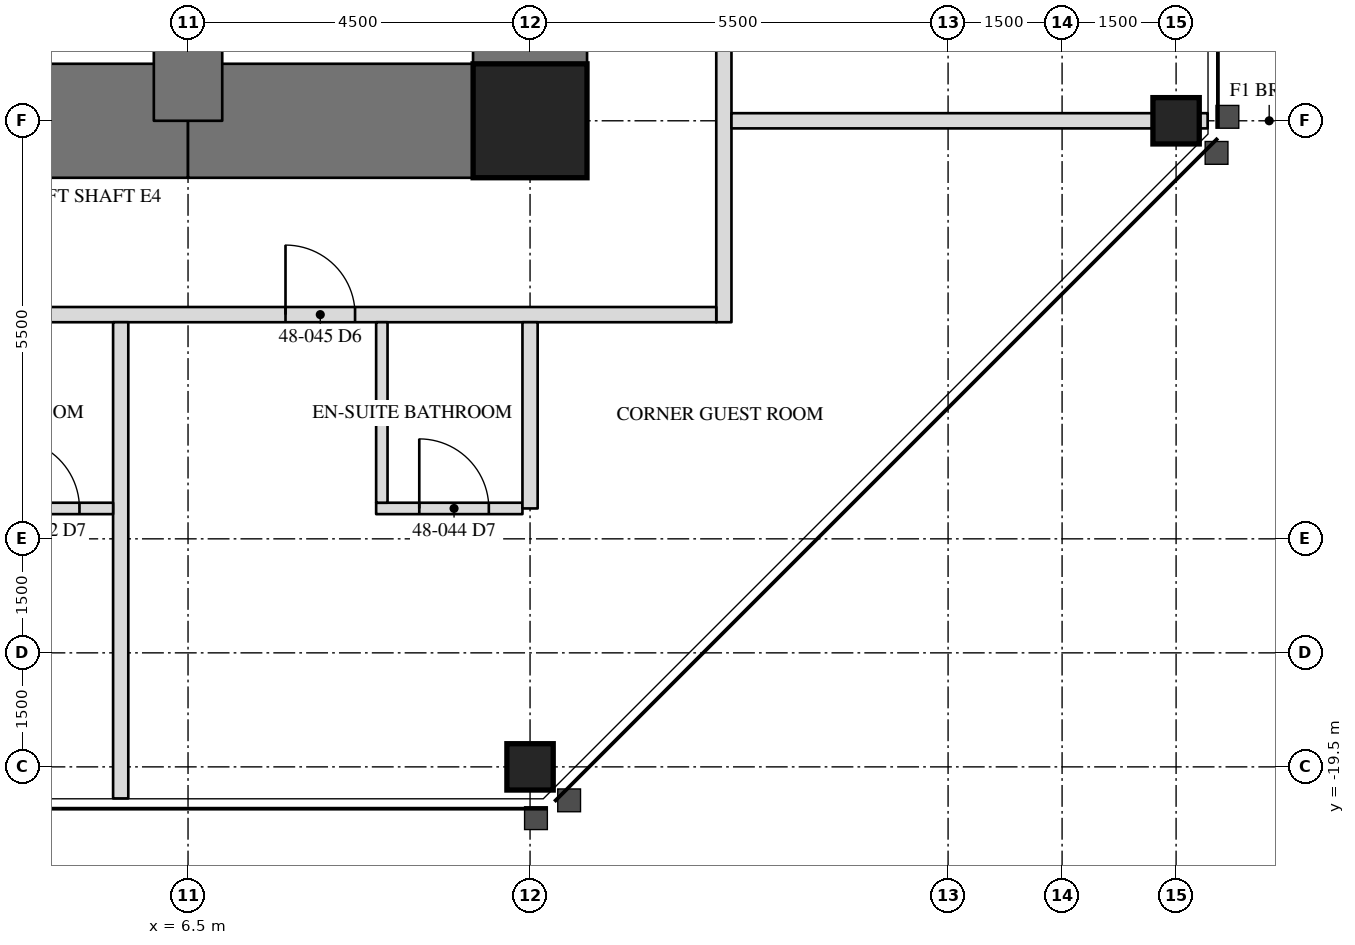
"""IFC4 building model, lengths in metres.
Left out: names, types, materials, properties, quantities, classifications, styles, units other than length and angle.
Written with IfcOpenShell. Run it as: python <this file> out.ifc"""

import sys

from ifc_helpers import new_model, si_unit, direction, frame, frame_2d, origin, origin_2d, place, context, subcontext, project, spatial, rectangle, hollow_rectangle, extrude, element, fill, save


model = new_model("IFC4")
c1 = context("Model", 3, precision=1e-05, world=origin(), true_north=direction((0.0, 1.0)))
c2 = subcontext(c1, "Body", "Model", "MODEL_VIEW")
j1 = project(units=[si_unit("LENGTHUNIT", "METRE"), si_unit("PLANEANGLEUNIT", "RADIAN")], contexts=[c1])
p1 = place(None, origin())
s1 = spatial("IfcSite", under=j1, at=p1, CompositionType="ELEMENT")
p2 = place(p1, origin())
s2 = spatial("IfcBuilding", under=s1, at=p2, CompositionType="ELEMENT")
p3 = place(p2, frame((0.0, 0.0, 204.7)))
s3 = spatial("IfcBuildingStorey", under=s2, at=p3, CompositionType="ELEMENT", Elevation=204.7)
for number, where, z_axis, x_axis in (
    (1, (11.0, -19.5, 0.0), (0.0, 0.0, 1.0), (1.0, 0.0, 0.0)),
    (2, (19.5, -11.0, 0.0), (0.0, 0.0, 1.0), (0.0, 1.0, 0.0)),
):
    element("IfcColumn", number, at=place(p3, frame(where, z_axis=z_axis, x_axis=x_axis)), inside=s3, PredefinedType="COLUMN", context=c2, shape_type="SweptSolid", body=[
        extrude(hollow_rectangle(XDim=0.61, YDim=0.61, WallThickness=0.076, at=origin_2d()), origin(), (0.0, 0.0, 1.0), 3.5),
    ])
p4 = place(p3, frame((11.0, -11.0, 0.0), z_axis=(0.0, 0.0, 1.0), x_axis=(0.0, 1.0, 0.0)))
e3 = element("IfcWall", 3, at=p4, inside=s3, PredefinedType="SHEAR", context=c2, shape_type="SweptSolid", body=[
    extrude(rectangle(XDim=22.0, YDim=1.5, at=frame_2d((11.0, 0.0))), origin(), (0.0, 0.0, 1.0), 3.5),
])
p5 = place(p4, frame((15.393, 0.0, 0.0)))
e4 = element("IfcOpeningElement", 4, at=p5, cuts=e3, PredefinedType="OPENING", context=c2, shape_type="SweptSolid", body=[
    extrude(rectangle(XDim=0.915, YDim=2.134, at=frame_2d((0.458, 1.067))), frame((0.0, 0.76, 0.0), z_axis=(0.0, -1.0, 0.0), x_axis=(1.0, 0.0, 0.0)), (0.0, 0.0, 1.0), 1.52),
])
p6 = place(p3, frame((-6.5, -11.0, 0.0), z_axis=(0.0, 0.0, 1.0), x_axis=(1.0, 0.0, 0.0)))
e5 = element("IfcWall", 5, at=p6, inside=s3, PredefinedType="SHEAR", context=c2, shape_type="SweptSolid", body=[
    extrude(rectangle(XDim=13.0, YDim=1.5, at=frame_2d((6.5, 0.0))), origin(), (0.0, 0.0, 1.0), 3.5),
])
p7 = place(p3, frame((6.5, -11.0, 0.0), z_axis=(0.0, 0.0, 1.0), x_axis=(1.0, 0.0, 0.0)))
e6 = element("IfcWall", 6, at=p7, inside=s3, PredefinedType="SHEAR", context=c2, shape_type="SweptSolid", body=[
    extrude(rectangle(XDim=4.5, YDim=1.5, at=frame_2d((2.25, 0.0))), origin(), (0.0, 0.0, 1.0), 3.5),
])
p8 = place(p3, frame((6.5, -11.0, 0.0), z_axis=(0.0, 0.0, 1.0), x_axis=(0.0, 1.0, 0.0)))
e7 = element("IfcWall", 7, at=p8, inside=s3, PredefinedType="SHEAR", context=c2, shape_type="SweptSolid", body=[
    extrude(rectangle(XDim=4.5, YDim=0.9, at=frame_2d((2.25, 0.0))), origin(), (0.0, 0.0, 1.0), 3.5),
])
p9 = place(p3, frame((11.0, -11.0, 0.0), z_axis=(0.0, 0.0, 1.0), x_axis=(1.0, 0.0, 0.0)))
e8 = element("IfcColumn", 8, at=p9, inside=s3, PredefinedType="COLUMN", context=c2, shape_type="SweptSolid", body=[
    extrude(hollow_rectangle(XDim=1.499, YDim=1.499, WallThickness=0.102, at=origin_2d()), origin(), (0.0, 0.0, 1.0), 3.5),
])
p10 = place(p3, frame((13.55, -13.65, 0.0), z_axis=(0.0, 0.0, 1.0), x_axis=(0.0, 1.0, 0.0)))
e9 = element("IfcWall", 9, at=p10, inside=s3, PredefinedType="PARTITIONING", context=c2, shape_type="SweptSolid", body=[
    extrude(rectangle(XDim=27.1, YDim=0.2, at=frame_2d((13.55, 0.0))), origin(), (0.0, 0.0, 1.0), 3.31),
])
p11 = place(p10, frame((4.283, 0.0, 0.0)))
e10 = element("IfcOpeningElement", 10, at=p11, cuts=e9, PredefinedType="OPENING", context=c2, shape_type="SweptSolid", body=[
    extrude(rectangle(XDim=0.915, YDim=2.134, at=frame_2d((0.458, 1.067))), frame((0.0, 0.11, 0.0), z_axis=(0.0, -1.0, 0.0), x_axis=(1.0, 0.0, 0.0)), (0.0, 0.0, 1.0), 0.22),
])
p12 = place(p10, frame((10.433, 0.0, 0.0)))
e11 = element("IfcOpeningElement", 11, at=p12, cuts=e9, PredefinedType="OPENING", context=c2, shape_type="SweptSolid", body=[
    extrude(rectangle(XDim=0.915, YDim=2.134, at=frame_2d((0.458, 1.067))), frame((0.0, 0.11, 0.0), z_axis=(0.0, -1.0, 0.0), x_axis=(1.0, 0.0, 0.0)), (0.0, 0.0, 1.0), 0.22),
])
p13 = place(p10, frame((16.046, 0.0, 0.0)))
e12 = element("IfcOpeningElement", 12, at=p13, cuts=e9, PredefinedType="OPENING", context=c2, shape_type="SweptSolid", body=[
    extrude(rectangle(XDim=0.915, YDim=2.134, at=frame_2d((0.458, 1.067))), frame((0.0, 0.11, 0.0), z_axis=(0.0, -1.0, 0.0), x_axis=(1.0, 0.0, 0.0)), (0.0, 0.0, 1.0), 0.22),
])
p14 = place(p10, frame((21.433, 0.0, 0.0)))
e13 = element("IfcOpeningElement", 13, at=p14, cuts=e9, PredefinedType="OPENING", context=c2, shape_type="SweptSolid", body=[
    extrude(rectangle(XDim=0.915, YDim=2.134, at=frame_2d((0.458, 1.067))), frame((0.0, 0.11, 0.0), z_axis=(0.0, -1.0, 0.0), x_axis=(1.0, 0.0, 0.0)), (0.0, 0.0, 1.0), 0.22),
])
p15 = place(p3, frame((-13.65, -13.55, 0.0), z_axis=(0.0, 0.0, 1.0), x_axis=(1.0, 0.0, 0.0)))
e14 = element("IfcWall", 14, at=p15, inside=s3, PredefinedType="PARTITIONING", context=c2, shape_type="SweptSolid", body=[
    extrude(rectangle(XDim=27.1, YDim=0.2, at=frame_2d((13.55, 0.0))), origin(), (0.0, 0.0, 1.0), 3.31),
])
p16 = place(p15, frame((4.884, 0.0, 0.0)))
e15 = element("IfcOpeningElement", 15, at=p16, cuts=e14, PredefinedType="OPENING", context=c2, shape_type="SweptSolid", body=[
    extrude(rectangle(XDim=0.915, YDim=2.134, at=frame_2d((0.458, 1.067))), frame((0.0, 0.11, 0.0), z_axis=(0.0, -1.0, 0.0), x_axis=(1.0, 0.0, 0.0)), (0.0, 0.0, 1.0), 0.22),
])
p17 = place(p15, frame((10.433, 0.0, 0.0)))
e16 = element("IfcOpeningElement", 16, at=p17, cuts=e14, PredefinedType="OPENING", context=c2, shape_type="SweptSolid", body=[
    extrude(rectangle(XDim=0.915, YDim=2.134, at=frame_2d((0.458, 1.067))), frame((0.0, 0.11, 0.0), z_axis=(0.0, -1.0, 0.0), x_axis=(1.0, 0.0, 0.0)), (0.0, 0.0, 1.0), 0.22),
])
p18 = place(p15, frame((16.046, 0.0, 0.0)))
e17 = element("IfcOpeningElement", 17, at=p18, cuts=e14, PredefinedType="OPENING", context=c2, shape_type="SweptSolid", body=[
    extrude(rectangle(XDim=0.915, YDim=2.134, at=frame_2d((0.458, 1.067))), frame((0.0, 0.11, 0.0), z_axis=(0.0, -1.0, 0.0), x_axis=(1.0, 0.0, 0.0)), (0.0, 0.0, 1.0), 0.22),
])
p19 = place(p15, frame((21.433, 0.0, 0.0)))
e18 = element("IfcOpeningElement", 18, at=p19, cuts=e14, PredefinedType="OPENING", context=c2, shape_type="SweptSolid", body=[
    extrude(rectangle(XDim=0.915, YDim=2.134, at=frame_2d((0.458, 1.067))), frame((0.0, 0.11, 0.0), z_axis=(0.0, -1.0, 0.0), x_axis=(1.0, 0.0, 0.0)), (0.0, 0.0, 1.0), 0.22),
])
p20 = place(p3, frame((13.65, -11.0, 0.0), z_axis=(0.0, 0.0, 1.0), x_axis=(1.0, 0.0, 0.0)))
e19 = element("IfcWall", 19, at=p20, inside=s3, PredefinedType="PARTITIONING", context=c2, shape_type="SweptSolid", body=[
    extrude(rectangle(XDim=6.265, YDim=0.2, at=frame_2d((3.133, 0.0))), origin(), (0.0, 0.0, 1.0), 2.802),
])
p21 = place(p3, frame((5.614, -13.65, 0.0), z_axis=(0.0, 0.0, 1.0), x_axis=(0.0, -1.0, 0.0)))
e20 = element("IfcWall", 20, at=p21, inside=s3, PredefinedType="PARTITIONING", context=c2, shape_type="SweptSolid", body=[
    extrude(rectangle(XDim=6.265, YDim=0.2, at=frame_2d((3.133, 0.0))), origin(), (0.0, 0.0, 1.0), 3.31),
])
p22 = place(p3, frame((3.589, -16.1, 0.0), z_axis=(0.0, 0.0, 1.0), x_axis=(1.0, 0.0, 0.0)))
e21 = element("IfcWall", 21, at=p22, inside=s3, PredefinedType="PARTITIONING", context=c2, shape_type="SweptSolid", body=[
    extrude(rectangle(XDim=1.925, YDim=0.15, at=frame_2d((0.962, 0.0))), origin(), (0.0, 0.0, 1.0), 3.31),
])
p23 = place(p22, frame((0.567, 0.0, 0.0)))
e22 = element("IfcOpeningElement", 22, at=p23, cuts=e21, PredefinedType="OPENING", context=c2, shape_type="SweptSolid", body=[
    extrude(rectangle(XDim=0.915, YDim=2.032, at=frame_2d((0.458, 1.016))), frame((0.0, 0.085, 0.0), z_axis=(0.0, -1.0, 0.0), x_axis=(1.0, 0.0, 0.0)), (0.0, 0.0, 1.0), 0.17),
])
p24 = place(p3, frame((8.975, -16.1, 0.0), z_axis=(0.0, 0.0, 1.0), x_axis=(1.0, 0.0, 0.0)))
e23 = element("IfcWall", 23, at=p24, inside=s3, PredefinedType="PARTITIONING", context=c2, shape_type="SweptSolid", body=[
    extrude(rectangle(XDim=1.925, YDim=0.15, at=frame_2d((0.962, 0.0))), origin(), (0.0, 0.0, 1.0), 3.31),
])
p25 = place(p24, frame((0.567, 0.0, 0.0)))
e24 = element("IfcOpeningElement", 24, at=p25, cuts=e23, PredefinedType="OPENING", context=c2, shape_type="SweptSolid", body=[
    extrude(rectangle(XDim=0.915, YDim=2.032, at=frame_2d((0.458, 1.016))), frame((0.0, 0.085, 0.0), z_axis=(0.0, -1.0, 0.0), x_axis=(1.0, 0.0, 0.0)), (0.0, 0.0, 1.0), 0.17),
])
p26 = place(p3, frame((9.05, -13.65, 0.0), z_axis=(0.0, 0.0, 1.0), x_axis=(0.0, -1.0, 0.0)))
e25 = element("IfcWall", 25, at=p26, inside=s3, PredefinedType="PARTITIONING", context=c2, shape_type="SweptSolid", body=[
    extrude(rectangle(XDim=2.375, YDim=0.15, at=frame_2d((1.188, 0.0))), origin(), (0.0, 0.0, 1.0), 3.31),
])
p27 = place(p3, frame((11.0, -13.65, 0.0), z_axis=(0.0, 0.0, 1.0), x_axis=(0.0, -1.0, 0.0)))
e26 = element("IfcWall", 26, at=p27, inside=s3, PredefinedType="PARTITIONING", context=c2, shape_type="SweptSolid", body=[
    extrude(rectangle(XDim=2.45, YDim=0.2, at=frame_2d((1.225, 0.0))), origin(), (0.0, 0.0, 1.0), 2.802),
])
p28 = place(p23, origin())
e27 = element("IfcDoor", 27, at=p28, inside=s3, OperationType="SINGLE_SWING_LEFT", PredefinedType="DOOR", context=c2, shape_type="SweptSolid", body=[
    extrude(rectangle(XDim=0.915, YDim=2.032, at=frame_2d((0.458, 1.016))), frame((0.0, 0.025, 0.0), z_axis=(0.0, -1.0, 0.0), x_axis=(1.0, 0.0, 0.0)), (0.0, 0.0, 1.0), 0.05),
])
fill(e22, e27)
p29 = place(p25, origin())
e28 = element("IfcDoor", 28, at=p29, inside=s3, OperationType="SINGLE_SWING_LEFT", PredefinedType="DOOR", context=c2, shape_type="SweptSolid", body=[
    extrude(rectangle(XDim=0.915, YDim=2.032, at=frame_2d((0.458, 1.016))), frame((0.0, 0.025, 0.0), z_axis=(0.0, -1.0, 0.0), x_axis=(1.0, 0.0, 0.0)), (0.0, 0.0, 1.0), 0.05),
])
fill(e24, e28)
p30 = place(p19, origin())
e29 = element("IfcDoor", 29, at=p30, inside=s3, OperationType="SINGLE_SWING_LEFT", PredefinedType="DOOR", context=c2, shape_type="SweptSolid", body=[
    extrude(rectangle(XDim=0.915, YDim=2.134, at=frame_2d((0.458, 1.067))), frame((0.0, 0.025, 0.0), z_axis=(0.0, -1.0, 0.0), x_axis=(1.0, 0.0, 0.0)), (0.0, 0.0, 1.0), 0.05),
])
fill(e18, e29)
save(model, sys.argv[1])
